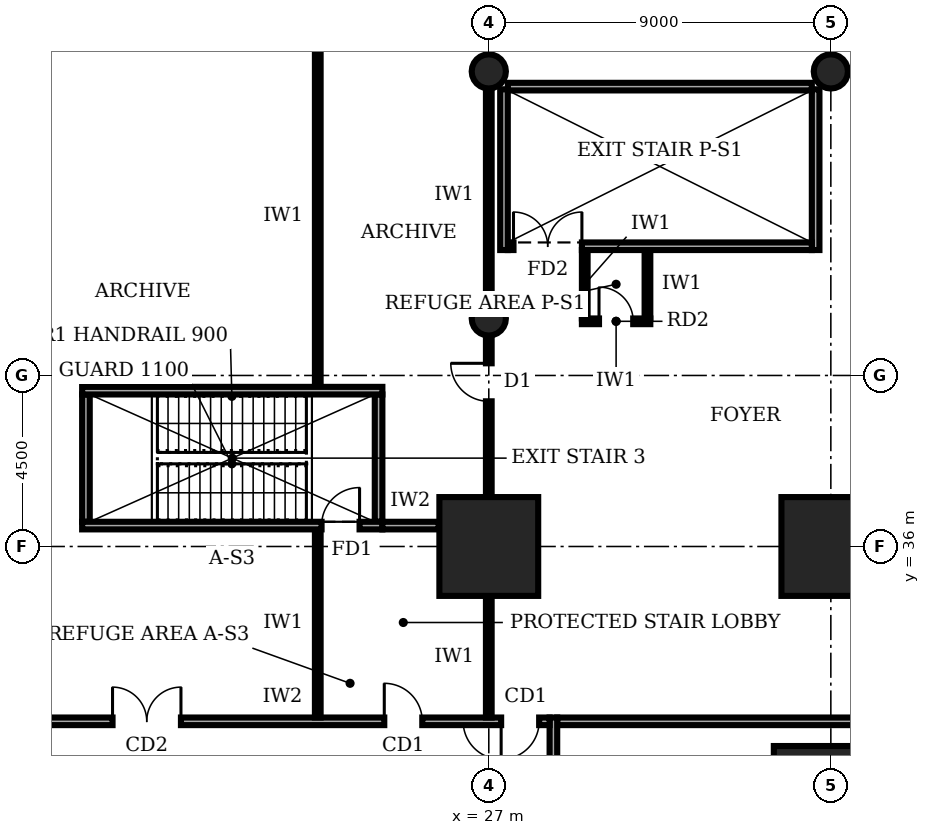
"""IFC4 building model, lengths in metres.
Left out: names, types, materials, properties, quantities, classifications, styles, units other than length and angle.
Written with IfcOpenShell. Run it as: python <this file> out.ifc"""

import sys

from ifc_helpers import new_model, si_unit, direction, frame, frame_2d, origin, origin_2d, place, context, subcontext, project, spatial, rectangle, circle, extrude, element, fill, save


model = new_model("IFC4")
c1 = context("Model", 3, precision=1e-05, world=origin(), true_north=direction((0.0, 1.0)))
c2 = subcontext(c1, "Body", "Model", "MODEL_VIEW")
j1 = project(units=[si_unit("LENGTHUNIT", "METRE"), si_unit("PLANEANGLEUNIT", "RADIAN")], contexts=[c1])
p1 = place(None, origin())
s1 = spatial("IfcSite", under=j1, at=p1, CompositionType="ELEMENT")
p2 = place(p1, origin())
s2 = spatial("IfcBuilding", under=s1, at=p2, CompositionType="ELEMENT")
p3 = place(p2, frame((0.0, 0.0, 16.0)))
s3 = spatial("IfcBuildingStorey", under=s2, at=p3, CompositionType="ELEMENT", Elevation=16.0)
p4 = place(p3, frame((36.0, 29.25, 0.0), z_axis=(0.0, 0.0, 1.0), x_axis=(1.0, 0.0, 0.0)))
e1 = element("IfcColumn", 1, at=p4, inside=s3, PredefinedType="COLUMN", context=c2, shape_type="SweptSolid", body=[
    extrude(rectangle(XDim=3.0, YDim=3.0, at=origin_2d()), origin(), (0.0, 0.0, 1.0), 5.0),
])
for number, where, z_axis, x_axis in (
    (2, (27.0, 36.0, 0.0), (0.0, 0.0, 1.0), (1.0, 0.0, 0.0)),
    (3, (36.0, 36.0, 0.0), (0.0, 0.0, 1.0), (1.0, 0.0, 0.0)),
):
    element("IfcColumn", number, at=place(p3, frame(where, z_axis=z_axis, x_axis=x_axis)), inside=s3, PredefinedType="COLUMN", context=c2, shape_type="SweptSolid", body=[
        extrude(rectangle(XDim=2.6, YDim=2.6, at=origin_2d()), origin(), (0.0, 0.0, 1.0), 5.0),
    ])
for number, where, z_axis, x_axis in (
    (4, (27.0, 42.0, 0.0), (0.0, 0.0, 1.0), (1.0, 0.0, 0.0)),
    (5, (27.0, 48.5, 0.0), (0.0, 0.0, 1.0), (1.0, 0.0, 0.0)),
    (6, (36.0, 48.5, 0.0), (0.0, 0.0, 1.0), (1.0, 0.0, 0.0)),
):
    element("IfcColumn", number, at=place(p3, frame(where, z_axis=z_axis, x_axis=x_axis)), inside=s3, PredefinedType="COLUMN", context=c2, shape_type="SweptSolid", body=[
        extrude(circle(Radius=0.45, at=origin_2d()), origin(), (0.0, 0.0, 1.0), 5.0),
    ])
p5 = place(p3, frame((28.7, 9.2, 0.0), z_axis=(0.0, 0.0, 1.0), x_axis=(0.0, 1.0, 0.0)))
e7 = element("IfcWall", 7, at=p5, inside=s3, PredefinedType="SOLIDWALL", context=c2, shape_type="SweptSolid", body=[
    extrude(rectangle(XDim=22.3, YDim=0.2, at=frame_2d((11.15, 0.0))), origin(), (0.0, 0.0, 1.0), 4.7),
])
p6 = place(p5, frame((3.4, 0.0, 0.0)))
e8 = element("IfcOpeningElement", 8, at=p6, cuts=e7, PredefinedType="OPENING", context=c2, shape_type="SweptSolid", body=[
    extrude(rectangle(XDim=1.8, YDim=2.1, at=frame_2d((0.9, 1.05))), frame((0.0, 0.11, 0.0), z_axis=(0.0, -1.0, 0.0), x_axis=(1.0, 0.0, 0.0)), (0.0, 0.0, 1.0), 0.22),
])
p7 = place(p5, frame((14.65, 0.0, 0.0)))
e9 = element("IfcOpeningElement", 9, at=p7, cuts=e7, PredefinedType="OPENING", context=c2, shape_type="SweptSolid", body=[
    extrude(rectangle(XDim=1.8, YDim=2.1, at=frame_2d((0.9, 1.05))), frame((0.0, 0.11, 0.0), z_axis=(0.0, -1.0, 0.0), x_axis=(1.0, 0.0, 0.0)), (0.0, 0.0, 1.0), 0.22),
])
p8 = place(p3, frame((28.6, 31.4, 0.0), z_axis=(0.0, 0.0, 1.0), x_axis=(-1.0, 0.0, 0.0)))
e10 = element("IfcWall", 10, at=p8, inside=s3, PredefinedType="SOLIDWALL", context=c2, shape_type="SweptSolid", body=[
    extrude(rectangle(XDim=16.9, YDim=0.2, at=frame_2d((8.45, 0.0))), origin(), (0.0, 0.0, 1.0), 4.7),
])
p9 = place(p8, frame((15.425, 0.0, 0.0)))
e11 = element("IfcOpeningElement", 11, at=p9, cuts=e10, PredefinedType="OPENING", context=c2, shape_type="SweptSolid", body=[
    extrude(rectangle(XDim=1.0, YDim=2.1, at=frame_2d((0.5, 1.05))), frame((0.0, 0.11, 0.0), z_axis=(0.0, -1.0, 0.0), x_axis=(1.0, 0.0, 0.0)), (0.0, 0.0, 1.0), 0.22),
])
p10 = place(p8, frame((9.7, 0.0, 0.0)))
e12 = element("IfcOpeningElement", 12, at=p10, cuts=e10, PredefinedType="OPENING", context=c2, shape_type="SweptSolid", body=[
    extrude(rectangle(XDim=1.8, YDim=2.1, at=frame_2d((0.9, 1.05))), frame((0.0, 0.11, 0.0), z_axis=(0.0, -1.0, 0.0), x_axis=(1.0, 0.0, 0.0)), (0.0, 0.0, 1.0), 0.22),
])
p11 = place(p8, frame((0.275, 0.0, 0.0)))
e13 = element("IfcOpeningElement", 13, at=p11, cuts=e10, PredefinedType="OPENING", context=c2, shape_type="SweptSolid", body=[
    extrude(rectangle(XDim=1.0, YDim=2.1, at=frame_2d((0.5, 1.05))), frame((0.0, 0.11, 0.0), z_axis=(0.0, -1.0, 0.0), x_axis=(1.0, 0.0, 0.0)), (0.0, 0.0, 1.0), 0.22),
])
p12 = place(p8, frame((3.35, 0.0, 0.0)))
e14 = element("IfcOpeningElement", 14, at=p12, cuts=e10, PredefinedType="OPENING", context=c2, shape_type="SweptSolid", body=[
    extrude(rectangle(XDim=1.0, YDim=2.1, at=frame_2d((0.5, 1.05))), frame((0.0, 0.11, 0.0), z_axis=(0.0, -1.0, 0.0), x_axis=(1.0, 0.0, 0.0)), (0.0, 0.0, 1.0), 0.22),
])
p13 = place(p3, frame((28.8, 31.4, 0.0), z_axis=(0.0, 0.0, 1.0), x_axis=(1.0, 0.0, 0.0)))
e15 = element("IfcWall", 15, at=p13, inside=s3, PredefinedType="SOLIDWALL", context=c2, shape_type="SweptSolid", body=[
    extrude(rectangle(XDim=11.52, YDim=0.2, at=frame_2d((5.76, 0.0))), origin(), (0.0, 0.0, 1.0), 4.7),
])
p14 = place(p3, frame((22.5, 31.5, 0.0), z_axis=(0.0, 0.0, 1.0), x_axis=(0.0, 1.0, 0.0)))
e16 = element("IfcWall", 16, at=p14, inside=s3, PredefinedType="PARTITIONING", context=c2, shape_type="SweptSolid", body=[
    extrude(rectangle(XDim=4.95, YDim=0.15, at=frame_2d((2.475, 0.0))), origin(), (0.0, 0.0, 1.0), 4.7),
])
p15 = place(p3, frame((22.5, 40.2, 0.0), z_axis=(0.0, 0.0, 1.0), x_axis=(0.0, 1.0, 0.0)))
e17 = element("IfcWall", 17, at=p15, inside=s3, PredefinedType="PARTITIONING", context=c2, shape_type="SweptSolid", body=[
    extrude(rectangle(XDim=9.0, YDim=0.15, at=frame_2d((4.5, 0.0))), origin(), (0.0, 0.0, 1.0), 4.7),
])
p16 = place(p3, frame((27.0, 31.5, 0.0), z_axis=(0.0, 0.0, 1.0), x_axis=(0.0, 1.0, 0.0)))
e18 = element("IfcWall", 18, at=p16, inside=s3, PredefinedType="PARTITIONING", context=c2, shape_type="SweptSolid", body=[
    extrude(rectangle(XDim=3.18, YDim=0.15, at=frame_2d((1.59, 0.0))), origin(), (0.0, 0.0, 1.0), 3.8),
])
p17 = place(p3, frame((27.0, 37.32, 0.0), z_axis=(0.0, 0.0, 1.0), x_axis=(0.0, 1.0, 0.0)))
e19 = element("IfcWall", 19, at=p17, inside=s3, PredefinedType="PARTITIONING", context=c2, shape_type="SweptSolid", body=[
    extrude(rectangle(XDim=4.21, YDim=0.15, at=frame_2d((2.105, 0.0))), origin(), (0.0, 0.0, 1.0), 3.7),
])
p18 = place(p17, frame((2.5, 0.0, 0.0)))
e20 = element("IfcOpeningElement", 20, at=p18, cuts=e19, PredefinedType="OPENING", context=c2, shape_type="SweptSolid", body=[
    extrude(rectangle(XDim=1.0, YDim=2.1, at=frame_2d((0.5, 1.05))), frame((0.0, 0.085, 0.0), z_axis=(0.0, -1.0, 0.0), x_axis=(1.0, 0.0, 0.0)), (0.0, 0.0, 1.0), 0.17),
])
p19 = place(p3, frame((27.0, 42.47, 0.0), z_axis=(0.0, 0.0, 1.0), x_axis=(0.0, 1.0, 0.0)))
e21 = element("IfcWall", 21, at=p19, inside=s3, PredefinedType="PARTITIONING", context=c2, shape_type="SweptSolid", body=[
    extrude(rectangle(XDim=5.56, YDim=0.15, at=frame_2d((2.78, 0.0))), origin(), (0.0, 0.0, 1.0), 3.7),
])
p20 = place(p3, frame((27.5, 43.9, 0.0), z_axis=(0.0, 0.0, 1.0), x_axis=(1.0, 0.0, 0.0)))
e22 = element("IfcWall", 22, at=p20, inside=s3, PredefinedType="SOLIDWALL", context=c2, shape_type="SweptSolid", body=[
    extrude(rectangle(XDim=8.0, YDim=0.2, at=frame_2d((4.0, 0.0))), origin(), (0.0, 0.0, 1.0), 4.7),
])
p21 = place(p20, frame((0.15, 0.0, 0.0)))
e23 = element("IfcOpeningElement", 23, at=p21, cuts=e22, PredefinedType="OPENING", context=c2, shape_type="SweptSolid", body=[
    extrude(rectangle(XDim=1.8, YDim=2.1, at=frame_2d((0.9, 1.05))), frame((0.0, 0.11, 0.0), z_axis=(0.0, -1.0, 0.0), x_axis=(1.0, 0.0, 0.0)), (0.0, 0.0, 1.0), 0.22),
])
p22 = place(p3, frame((27.5, 48.1, 0.0), z_axis=(0.0, 0.0, 1.0), x_axis=(1.0, 0.0, 0.0)))
e24 = element("IfcWall", 24, at=p22, inside=s3, PredefinedType="SOLIDWALL", context=c2, shape_type="SweptSolid", body=[
    extrude(rectangle(XDim=8.0, YDim=0.2, at=frame_2d((4.0, 0.0))), origin(), (0.0, 0.0, 1.0), 4.7),
])
for number, where, z_axis, x_axis in (
    (25, (27.4, 43.8, 0.0), (0.0, 0.0, 1.0), (0.0, 1.0, 0.0)),
    (26, (35.6, 43.8, 0.0), (0.0, 0.0, 1.0), (0.0, 1.0, 0.0)),
):
    element("IfcWall", number, at=place(p3, frame(where, z_axis=z_axis, x_axis=x_axis)), inside=s3, PredefinedType="SOLIDWALL", context=c2, shape_type="SweptSolid", body=[
        extrude(rectangle(XDim=4.23, YDim=0.2, at=frame_2d((2.115, 0.0))), origin(), (0.0, 0.0, 1.0), 4.7),
    ])
p23 = place(p3, frame((24.2, 36.55, 0.0), z_axis=(0.0, 0.0, 1.0), x_axis=(1.0, 0.0, 0.0)))
e27 = element("IfcWall", 27, at=p23, inside=s3, PredefinedType="SOLIDWALL", context=c2, shape_type="SweptSolid", body=[
    extrude(rectangle(XDim=1.48, YDim=0.2, at=frame_2d((0.74, 0.0))), origin(), (0.0, 0.0, 1.0), 4.7),
])
p24 = place(p3, frame((16.3, 36.55, 0.0), z_axis=(0.0, 0.0, 1.0), x_axis=(1.0, 0.0, 0.0)))
e28 = element("IfcWall", 28, at=p24, inside=s3, PredefinedType="SOLIDWALL", context=c2, shape_type="SweptSolid", body=[
    extrude(rectangle(XDim=7.9, YDim=0.2, at=frame_2d((3.95, 0.0))), origin(), (0.0, 0.0, 1.0), 4.7),
])
p25 = place(p24, frame((6.3, 0.0, 0.0)))
e29 = element("IfcOpeningElement", 29, at=p25, cuts=e28, PredefinedType="OPENING", context=c2, shape_type="SweptSolid", body=[
    extrude(rectangle(XDim=1.0, YDim=2.1, at=frame_2d((0.5, 1.05))), frame((0.0, 0.11, 0.0), z_axis=(0.0, -1.0, 0.0), x_axis=(1.0, 0.0, 0.0)), (0.0, 0.0, 1.0), 0.22),
])
p26 = place(p3, frame((16.3, 40.1, 0.0), z_axis=(0.0, 0.0, 1.0), x_axis=(1.0, 0.0, 0.0)))
e30 = element("IfcWall", 30, at=p26, inside=s3, PredefinedType="SOLIDWALL", context=c2, shape_type="SweptSolid", body=[
    extrude(rectangle(XDim=7.9, YDim=0.2, at=frame_2d((3.95, 0.0))), origin(), (0.0, 0.0, 1.0), 4.7),
])
for number, where, z_axis, x_axis in (
    (31, (16.4, 36.65, 0.0), (0.0, 0.0, 1.0), (0.0, 1.0, 0.0)),
    (32, (24.1, 36.65, 0.0), (0.0, 0.0, 1.0), (0.0, 1.0, 0.0)),
):
    element("IfcWall", number, at=place(p3, frame(where, z_axis=z_axis, x_axis=x_axis)), inside=s3, PredefinedType="SOLIDWALL", context=c2, shape_type="SweptSolid", body=[
        extrude(rectangle(XDim=3.35, YDim=0.2, at=frame_2d((1.675, 0.0))), origin(), (0.0, 0.0, 1.0), 4.7),
    ])
p27 = place(p3, frame((31.175, 42.0, 0.0), z_axis=(0.0, 0.0, 1.0), x_axis=(0.0, 1.0, 0.0)))
e33 = element("IfcWall", 33, at=p27, inside=s3, PredefinedType="PARTITIONING", context=c2, shape_type="SweptSolid", body=[
    extrude(rectangle(XDim=1.8, YDim=0.15, at=frame_2d((0.9, 0.0))), origin(), (0.0, 0.0, 1.0), 4.7),
])
p28 = place(p3, frame((29.45, 41.925, 0.0), z_axis=(0.0, 0.0, 1.0), x_axis=(1.0, 0.0, 0.0)))
e34 = element("IfcWall", 34, at=p28, inside=s3, PredefinedType="PARTITIONING", context=c2, shape_type="SweptSolid", body=[
    extrude(rectangle(XDim=1.8, YDim=0.15, at=frame_2d((0.9, 0.0))), origin(), (0.0, 0.0, 1.0), 4.7),
])
p29 = place(p28, frame((0.45, 0.0, 0.0)))
e35 = element("IfcOpeningElement", 35, at=p29, cuts=e34, PredefinedType="OPENING", context=c2, shape_type="SweptSolid", body=[
    extrude(rectangle(XDim=0.9, YDim=2.1, at=frame_2d((0.45, 1.05))), frame((0.0, 0.085, 0.0), z_axis=(0.0, -1.0, 0.0), x_axis=(1.0, 0.0, 0.0)), (0.0, 0.0, 1.0), 0.17),
])
p30 = place(p3, frame((29.525, 42.0, 0.0), z_axis=(0.0, 0.0, 1.0), x_axis=(0.0, 1.0, 0.0)))
e36 = element("IfcWall", 36, at=p30, inside=s3, PredefinedType="PARTITIONING", context=c2, shape_type="SweptSolid", body=[
    extrude(rectangle(XDim=1.8, YDim=0.15, at=frame_2d((0.9, 0.0))), origin(), (0.0, 0.0, 1.0), 4.7),
])
p31 = place(p10, frame((1.8, 0.0, 0.0), z_axis=(0.0, 0.0, 1.0), x_axis=(-1.0, 0.0, 0.0)))
e37 = element("IfcDoor", 37, at=p31, inside=s3, OperationType="DOUBLE_DOOR_SINGLE_SWING", PredefinedType="DOOR", context=c2, shape_type="SweptSolid", body=[
    extrude(rectangle(XDim=1.8, YDim=2.1, at=frame_2d((0.9, 1.05))), frame((0.0, 0.025, 0.0), z_axis=(0.0, -1.0, 0.0), x_axis=(1.0, 0.0, 0.0)), (0.0, 0.0, 1.0), 0.05),
])
fill(e12, e37)
p32 = place(p11, origin())
e38 = element("IfcDoor", 38, at=p32, inside=s3, OperationType="SINGLE_SWING_RIGHT", PredefinedType="DOOR", context=c2, shape_type="SweptSolid", body=[
    extrude(rectangle(XDim=1.0, YDim=2.1, at=frame_2d((0.5, 1.05))), frame((0.0, 0.025, 0.0), z_axis=(0.0, -1.0, 0.0), x_axis=(1.0, 0.0, 0.0)), (0.0, 0.0, 1.0), 0.05),
])
fill(e13, e38)
p33 = place(p12, frame((1.0, 0.0, 0.0), z_axis=(0.0, 0.0, 1.0), x_axis=(-1.0, 0.0, 0.0)))
e39 = element("IfcDoor", 39, at=p33, inside=s3, OperationType="SINGLE_SWING_LEFT", PredefinedType="DOOR", context=c2, shape_type="SweptSolid", body=[
    extrude(rectangle(XDim=1.0, YDim=2.1, at=frame_2d((0.5, 1.05))), frame((0.0, 0.025, 0.0), z_axis=(0.0, -1.0, 0.0), x_axis=(1.0, 0.0, 0.0)), (0.0, 0.0, 1.0), 0.05),
])
fill(e14, e39)
p34 = place(p18, origin())
e40 = element("IfcDoor", 40, at=p34, inside=s3, OperationType="SINGLE_SWING_RIGHT", PredefinedType="DOOR", context=c2, shape_type="SweptSolid", body=[
    extrude(rectangle(XDim=1.0, YDim=2.1, at=frame_2d((0.5, 1.05))), frame((0.0, 0.025, 0.0), z_axis=(0.0, -1.0, 0.0), x_axis=(1.0, 0.0, 0.0)), (0.0, 0.0, 1.0), 0.05),
])
fill(e20, e40)
p35 = place(p21, origin())
e41 = element("IfcDoor", 41, at=p35, inside=s3, OperationType="DOUBLE_DOOR_SINGLE_SWING", PredefinedType="DOOR", context=c2, shape_type="SweptSolid", body=[
    extrude(rectangle(XDim=1.8, YDim=2.1, at=frame_2d((0.9, 1.05))), frame((0.0, 0.025, 0.0), z_axis=(0.0, -1.0, 0.0), x_axis=(1.0, 0.0, 0.0)), (0.0, 0.0, 1.0), 0.05),
])
fill(e23, e41)
p36 = place(p25, origin())
e42 = element("IfcDoor", 42, at=p36, inside=s3, OperationType="SINGLE_SWING_RIGHT", PredefinedType="DOOR", context=c2, shape_type="SweptSolid", body=[
    extrude(rectangle(XDim=1.0, YDim=2.1, at=frame_2d((0.5, 1.05))), frame((0.0, 0.025, 0.0), z_axis=(0.0, -1.0, 0.0), x_axis=(1.0, 0.0, 0.0)), (0.0, 0.0, 1.0), 0.05),
])
fill(e29, e42)
p37 = place(p29, origin())
e43 = element("IfcDoor", 43, at=p37, inside=s3, OperationType="SINGLE_SWING_LEFT", PredefinedType="DOOR", context=c2, shape_type="SweptSolid", body=[
    extrude(rectangle(XDim=0.9, YDim=2.1, at=frame_2d((0.45, 1.05))), frame((0.0, 0.025, 0.0), z_axis=(0.0, -1.0, 0.0), x_axis=(1.0, 0.0, 0.0)), (0.0, 0.0, 1.0), 0.05),
])
fill(e35, e43)
save(model, sys.argv[1])
